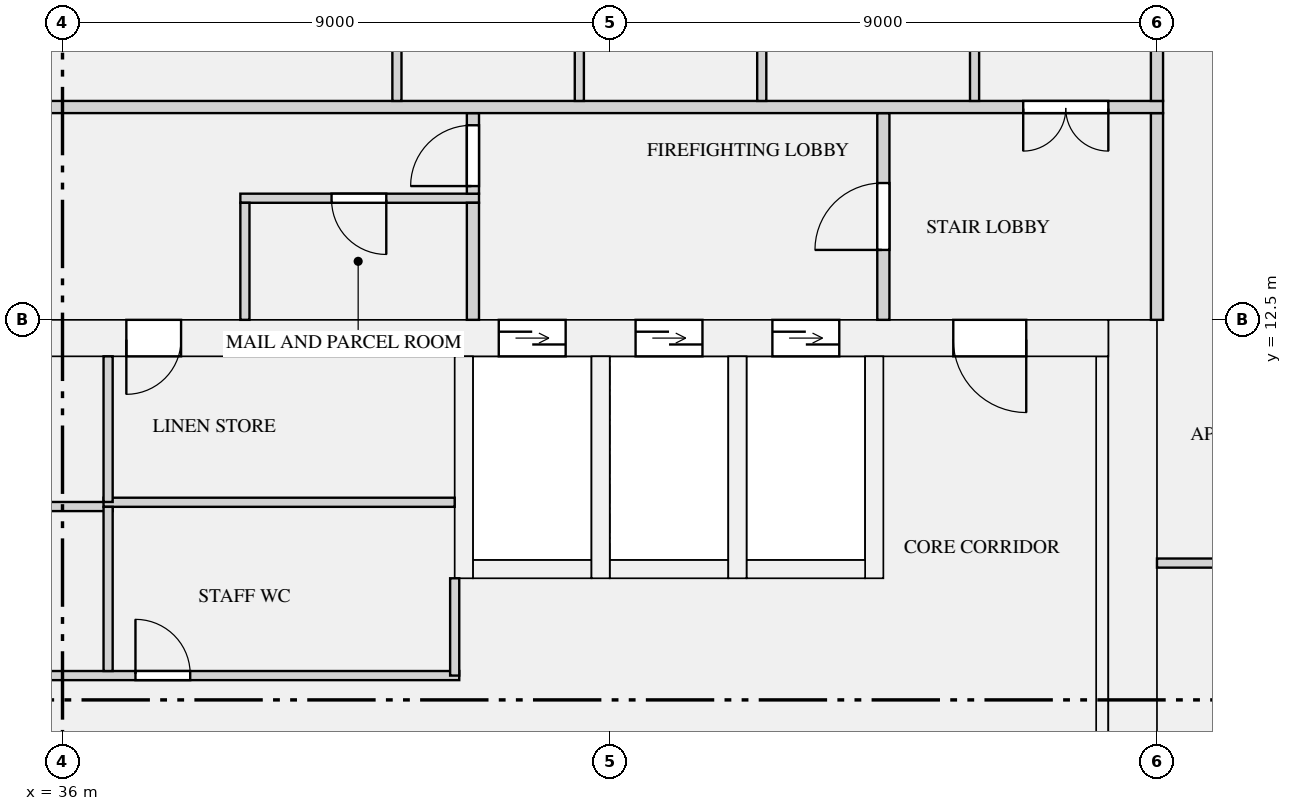
"""IFC4 building model, lengths in metres.
Left out: names, types, materials, properties, quantities, classifications, styles, units other than length and angle.
Written with IfcOpenShell. Run it as: python <this file> out.ifc"""

import sys

from ifc_helpers import new_model, si_unit, direction, frame, frame_2d, origin, place, context, subcontext, project, spatial, rectangle, extrude, element, fill, save


model = new_model("IFC4")
c1 = context("Model", 3, precision=1e-05, world=origin(), true_north=direction((0.0, 1.0)))
c2 = subcontext(c1, "Body", "Model", "MODEL_VIEW")
j1 = project(units=[si_unit("LENGTHUNIT", "METRE"), si_unit("PLANEANGLEUNIT", "RADIAN")], contexts=[c1])
p1 = place(None, origin())
s1 = spatial("IfcSite", under=j1, at=p1, CompositionType="ELEMENT")
p2 = place(p1, origin())
s2 = spatial("IfcBuilding", under=s1, at=p2, CompositionType="ELEMENT")
p3 = place(p2, frame((0.0, 0.0, 127.65)))
s3 = spatial("IfcBuildingStorey", under=s2, at=p3, CompositionType="ELEMENT", Elevation=127.65)
p4 = place(p3, frame((53.6, 0.0, 0.0), z_axis=(0.0, 0.0, 1.0), x_axis=(0.0, 1.0, 0.0)))
e1 = element("IfcWall", 1, at=p4, inside=s3, PredefinedType="SHEAR", context=c2, shape_type="SweptSolid", body=[
    extrude(rectangle(XDim=12.5, YDim=0.8, at=frame_2d((6.25, 0.0))), origin(), (0.0, 0.0, 1.0), 3.15),
])
p5 = place(p3, frame((18.8, 12.2, 0.0), z_axis=(0.0, 0.0, 1.0), x_axis=(1.0, 0.0, 0.0)))
e2 = element("IfcWall", 2, at=p5, inside=s3, PredefinedType="SHEAR", context=c2, shape_type="SweptSolid", body=[
    extrude(rectangle(XDim=34.4, YDim=0.6, at=frame_2d((17.2, 0.0))), origin(), (0.0, 0.0, 1.0), 3.15),
])
p6 = place(p5, frame((24.375, 0.0, 0.0)))
e3 = element("IfcOpeningElement", 3, at=p6, cuts=e2, PredefinedType="OPENING", context=c2, shape_type="SweptSolid", body=[
    extrude(rectangle(XDim=1.1, YDim=2.1, at=frame_2d((0.55, 1.05))), frame((0.0, 0.31, 0.0), z_axis=(0.0, -1.0, 0.0), x_axis=(1.0, 0.0, 0.0)), (0.0, 0.0, 1.0), 0.62),
])
p7 = place(p5, frame((26.625, 0.0, 0.0)))
e4 = element("IfcOpeningElement", 4, at=p7, cuts=e2, PredefinedType="OPENING", context=c2, shape_type="SweptSolid", body=[
    extrude(rectangle(XDim=1.1, YDim=2.1, at=frame_2d((0.55, 1.05))), frame((0.0, 0.31, 0.0), z_axis=(0.0, -1.0, 0.0), x_axis=(1.0, 0.0, 0.0)), (0.0, 0.0, 1.0), 0.62),
])
p8 = place(p5, frame((28.875, 0.0, 0.0)))
e5 = element("IfcOpeningElement", 5, at=p8, cuts=e2, PredefinedType="OPENING", context=c2, shape_type="SweptSolid", body=[
    extrude(rectangle(XDim=1.1, YDim=2.1, at=frame_2d((0.55, 1.05))), frame((0.0, 0.31, 0.0), z_axis=(0.0, -1.0, 0.0), x_axis=(1.0, 0.0, 0.0)), (0.0, 0.0, 1.0), 0.62),
])
p9 = place(p5, frame((4.75, 0.0, 0.0)))
e6 = element("IfcOpeningElement", 6, at=p9, cuts=e2, PredefinedType="OPENING", context=c2, shape_type="SweptSolid", body=[
    extrude(rectangle(XDim=0.9, YDim=2.1, at=frame_2d((0.45, 1.05))), frame((0.0, 0.31, 0.0), z_axis=(0.0, -1.0, 0.0), x_axis=(1.0, 0.0, 0.0)), (0.0, 0.0, 1.0), 0.62),
])
p10 = place(p5, frame((11.75, 0.0, 0.0)))
e7 = element("IfcOpeningElement", 7, at=p10, cuts=e2, PredefinedType="OPENING", context=c2, shape_type="SweptSolid", body=[
    extrude(rectangle(XDim=0.9, YDim=2.1, at=frame_2d((0.45, 1.05))), frame((0.0, 0.31, 0.0), z_axis=(0.0, -1.0, 0.0), x_axis=(1.0, 0.0, 0.0)), (0.0, 0.0, 1.0), 0.62),
])
p11 = place(p5, frame((18.25, 0.0, 0.0)))
e8 = element("IfcOpeningElement", 8, at=p11, cuts=e2, PredefinedType="OPENING", context=c2, shape_type="SweptSolid", body=[
    extrude(rectangle(XDim=0.9, YDim=2.1, at=frame_2d((0.45, 1.05))), frame((0.0, 0.31, 0.0), z_axis=(0.0, -1.0, 0.0), x_axis=(1.0, 0.0, 0.0)), (0.0, 0.0, 1.0), 0.62),
])
p12 = place(p5, frame((1.35, 0.0, 0.0)))
e9 = element("IfcOpeningElement", 9, at=p12, cuts=e2, PredefinedType="OPENING", context=c2, shape_type="SweptSolid", body=[
    extrude(rectangle(XDim=1.2, YDim=2.1, at=frame_2d((0.6, 1.05))), frame((0.0, 0.31, 0.0), z_axis=(0.0, -1.0, 0.0), x_axis=(1.0, 0.0, 0.0)), (0.0, 0.0, 1.0), 0.62),
])
p13 = place(p5, frame((31.85, 0.0, 0.0)))
e10 = element("IfcOpeningElement", 10, at=p13, cuts=e2, PredefinedType="OPENING", context=c2, shape_type="SweptSolid", body=[
    extrude(rectangle(XDim=1.2, YDim=2.1, at=frame_2d((0.6, 1.05))), frame((0.0, 0.31, 0.0), z_axis=(0.0, -1.0, 0.0), x_axis=(1.0, 0.0, 0.0)), (0.0, 0.0, 1.0), 0.62),
])
p14 = place(p3, frame((53.1, 1.0, 0.0), z_axis=(0.0, 0.0, 1.0), x_axis=(0.0, 1.0, 0.0)))
e11 = element("IfcWall", 11, at=p14, inside=s3, PredefinedType="SHEAR", context=c2, shape_type="SweptSolid", body=[
    extrude(rectangle(XDim=10.9, YDim=0.2, at=frame_2d((5.45, 0.0))), origin(), (0.0, 0.0, 1.0), 3.15),
])
p15 = place(p3, frame((42.75, 8.4, 0.0), z_axis=(0.0, 0.0, 1.0), x_axis=(1.0, 0.0, 0.0)))
e12 = element("IfcWall", 12, at=p15, inside=s3, PredefinedType="SHEAR", context=c2, shape_type="SweptSolid", body=[
    extrude(rectangle(XDim=1.95, YDim=0.3, at=frame_2d((0.975, 0.0))), origin(), (0.0, 0.0, 1.0), 3.15),
])
p16 = place(p3, frame((42.6, 8.25, 0.0), z_axis=(0.0, 0.0, 1.0), x_axis=(0.0, 1.0, 0.0)))
e13 = element("IfcWall", 13, at=p16, inside=s3, PredefinedType="SHEAR", context=c2, shape_type="SweptSolid", body=[
    extrude(rectangle(XDim=3.65, YDim=0.3, at=frame_2d((1.825, 0.0))), origin(), (0.0, 0.0, 1.0), 3.15),
])
p17 = place(p3, frame((45.0, 8.4, 0.0), z_axis=(0.0, 0.0, 1.0), x_axis=(1.0, 0.0, 0.0)))
e14 = element("IfcWall", 14, at=p17, inside=s3, PredefinedType="SHEAR", context=c2, shape_type="SweptSolid", body=[
    extrude(rectangle(XDim=1.95, YDim=0.3, at=frame_2d((0.975, 0.0))), origin(), (0.0, 0.0, 1.0), 3.15),
])
p18 = place(p3, frame((44.85, 8.25, 0.0), z_axis=(0.0, 0.0, 1.0), x_axis=(0.0, 1.0, 0.0)))
e15 = element("IfcWall", 15, at=p18, inside=s3, PredefinedType="SHEAR", context=c2, shape_type="SweptSolid", body=[
    extrude(rectangle(XDim=3.65, YDim=0.3, at=frame_2d((1.825, 0.0))), origin(), (0.0, 0.0, 1.0), 3.15),
])
p19 = place(p3, frame((47.25, 8.4, 0.0), z_axis=(0.0, 0.0, 1.0), x_axis=(1.0, 0.0, 0.0)))
e16 = element("IfcWall", 16, at=p19, inside=s3, PredefinedType="SHEAR", context=c2, shape_type="SweptSolid", body=[
    extrude(rectangle(XDim=1.95, YDim=0.3, at=frame_2d((0.975, 0.0))), origin(), (0.0, 0.0, 1.0), 3.15),
])
for number, where, z_axis, x_axis in (
    (17, (47.1, 8.25, 0.0), (0.0, 0.0, 1.0), (0.0, 1.0, 0.0)),
    (18, (49.35, 8.25, 0.0), (0.0, 0.0, 1.0), (0.0, 1.0, 0.0)),
):
    element("IfcWall", number, at=place(p3, frame(where, z_axis=z_axis, x_axis=x_axis)), inside=s3, PredefinedType="SHEAR", context=c2, shape_type="SweptSolid", body=[
        extrude(rectangle(XDim=3.65, YDim=0.3, at=frame_2d((1.825, 0.0))), origin(), (0.0, 0.0, 1.0), 3.15),
    ])
p20 = place(p3, frame((22.725, 6.65, 0.0), z_axis=(0.0, 0.0, 1.0), x_axis=(1.0, 0.0, 0.0)))
e19 = element("IfcWall", 19, at=p20, inside=s3, PredefinedType="PARTITIONING", context=c2, shape_type="SweptSolid", body=[
    extrude(rectangle(XDim=19.8, YDim=0.15, at=frame_2d((9.9, 0.0))), origin(), (0.0, 0.0, 1.0), 2.65),
])
p21 = place(p20, frame((0.825, 0.0, 0.0)))
e20 = element("IfcOpeningElement", 20, at=p21, cuts=e19, PredefinedType="OPENING", context=c2, shape_type="SweptSolid", body=[
    extrude(rectangle(XDim=0.9, YDim=2.1, at=frame_2d((0.45, 1.05))), frame((0.0, 0.085, 0.0), z_axis=(0.0, -1.0, 0.0), x_axis=(1.0, 0.0, 0.0)), (0.0, 0.0, 1.0), 0.17),
])
p22 = place(p20, frame((7.825, 0.0, 0.0)))
e21 = element("IfcOpeningElement", 21, at=p22, cuts=e19, PredefinedType="OPENING", context=c2, shape_type="SweptSolid", body=[
    extrude(rectangle(XDim=0.9, YDim=2.1, at=frame_2d((0.45, 1.05))), frame((0.0, 0.085, 0.0), z_axis=(0.0, -1.0, 0.0), x_axis=(1.0, 0.0, 0.0)), (0.0, 0.0, 1.0), 0.17),
])
p23 = place(p20, frame((14.475, 0.0, 0.0)))
e22 = element("IfcOpeningElement", 22, at=p23, cuts=e19, PredefinedType="OPENING", context=c2, shape_type="SweptSolid", body=[
    extrude(rectangle(XDim=0.9, YDim=2.1, at=frame_2d((0.45, 1.05))), frame((0.0, 0.085, 0.0), z_axis=(0.0, -1.0, 0.0), x_axis=(1.0, 0.0, 0.0)), (0.0, 0.0, 1.0), 0.17),
])
p24 = place(p3, frame((22.725, 9.43, 0.0), z_axis=(0.0, 0.0, 1.0), x_axis=(1.0, 0.0, 0.0)))
e23 = element("IfcWall", 23, at=p24, inside=s3, PredefinedType="PARTITIONING", context=c2, shape_type="SweptSolid", body=[
    extrude(rectangle(XDim=14.1, YDim=0.15, at=frame_2d((7.05, 0.0))), origin(), (0.0, 0.0, 1.0), 2.65),
])
p25 = place(p3, frame((36.675, 9.5, 0.0), z_axis=(0.0, 0.0, 1.0), x_axis=(1.0, 0.0, 0.0)))
e24 = element("IfcWall", 24, at=p25, inside=s3, PredefinedType="PARTITIONING", context=c2, shape_type="SweptSolid", body=[
    extrude(rectangle(XDim=5.775, YDim=0.15, at=frame_2d((2.887, 0.0))), origin(), (0.0, 0.0, 1.0), 2.65),
])
p26 = place(p3, frame((38.925, 14.5, 0.0), z_axis=(0.0, 0.0, 1.0), x_axis=(1.0, 0.0, 0.0)))
e25 = element("IfcWall", 25, at=p26, inside=s3, PredefinedType="PARTITIONING", context=c2, shape_type="SweptSolid", body=[
    extrude(rectangle(XDim=3.925, YDim=0.15, at=frame_2d((1.962, 0.0))), origin(), (0.0, 0.0, 1.0), 2.65),
])
p27 = place(p26, frame((1.5, 0.0, 0.0)))
e26 = element("IfcOpeningElement", 26, at=p27, cuts=e25, PredefinedType="OPENING", context=c2, shape_type="SweptSolid", body=[
    extrude(rectangle(XDim=0.9, YDim=2.1, at=frame_2d((0.45, 1.05))), frame((0.0, 0.085, 0.0), z_axis=(0.0, -1.0, 0.0), x_axis=(1.0, 0.0, 0.0)), (0.0, 0.0, 1.0), 0.17),
])
p28 = place(p3, frame((42.45, 6.65, 0.0), z_axis=(0.0, 0.0, 1.0), x_axis=(0.0, 1.0, 0.0)))
e27 = element("IfcWall", 27, at=p28, inside=s3, PredefinedType="PARTITIONING", context=c2, shape_type="SweptSolid", body=[
    extrude(rectangle(XDim=1.6, YDim=0.15, at=frame_2d((0.8, 0.0))), origin(), (0.0, 0.0, 1.0), 2.65),
])
p29 = place(p3, frame((36.75, 6.725, 0.0), z_axis=(0.0, 0.0, 1.0), x_axis=(0.0, 1.0, 0.0)))
e28 = element("IfcWall", 28, at=p29, inside=s3, PredefinedType="PARTITIONING", context=c2, shape_type="SweptSolid", body=[
    extrude(rectangle(XDim=2.7, YDim=0.15, at=frame_2d((1.35, 0.0))), origin(), (0.0, 0.0, 1.0), 2.65),
])
p30 = place(p3, frame((36.75, 9.505, 0.0), z_axis=(0.0, 0.0, 1.0), x_axis=(0.0, 1.0, 0.0)))
e29 = element("IfcWall", 29, at=p30, inside=s3, PredefinedType="PARTITIONING", context=c2, shape_type="SweptSolid", body=[
    extrude(rectangle(XDim=2.395, YDim=0.15, at=frame_2d((1.198, 0.0))), origin(), (0.0, 0.0, 1.0), 2.65),
])
p31 = place(p3, frame((39.0, 12.5, 0.0), z_axis=(0.0, 0.0, 1.0), x_axis=(0.0, 1.0, 0.0)))
e30 = element("IfcWall", 30, at=p31, inside=s3, PredefinedType="PARTITIONING", context=c2, shape_type="SweptSolid", body=[
    extrude(rectangle(XDim=1.925, YDim=0.15, at=frame_2d((0.962, 0.0))), origin(), (0.0, 0.0, 1.0), 2.65),
])
p32 = place(p3, frame((42.75, 12.5, 0.0), z_axis=(0.0, 0.0, 1.0), x_axis=(0.0, 1.0, 0.0)))
e31 = element("IfcWall", 31, at=p32, inside=s3, PredefinedType="PARTITIONING", context=c2, shape_type="SweptSolid", body=[
    extrude(rectangle(XDim=1.925, YDim=0.2, at=frame_2d((0.962, 0.0))), origin(), (0.0, 0.0, 1.0), 2.65),
])
p33 = place(p3, frame((49.5, 12.5, 0.0), z_axis=(0.0, 0.0, 1.0), x_axis=(0.0, 1.0, 0.0)))
e32 = element("IfcWall", 32, at=p33, inside=s3, PredefinedType="PARTITIONING", context=c2, shape_type="SweptSolid", body=[
    extrude(rectangle(XDim=3.4, YDim=0.2, at=frame_2d((1.7, 0.0))), origin(), (0.0, 0.0, 1.0), 2.65),
])
p34 = place(p33, frame((1.15, 0.0, 0.0)))
e33 = element("IfcOpeningElement", 33, at=p34, cuts=e32, PredefinedType="OPENING", context=c2, shape_type="SweptSolid", body=[
    extrude(rectangle(XDim=1.1, YDim=2.1, at=frame_2d((0.55, 1.05))), frame((0.0, 0.11, 0.0), z_axis=(0.0, -1.0, 0.0), x_axis=(1.0, 0.0, 0.0)), (0.0, 0.0, 1.0), 0.22),
])
p35 = place(p3, frame((54.0, 12.5, 0.0), z_axis=(0.0, 0.0, 1.0), x_axis=(0.0, 1.0, 0.0)))
e34 = element("IfcWall", 34, at=p35, inside=s3, PredefinedType="PARTITIONING", context=c2, shape_type="SweptSolid", body=[
    extrude(rectangle(XDim=3.4, YDim=0.2, at=frame_2d((1.7, 0.0))), origin(), (0.0, 0.0, 1.0), 2.65),
])
p36 = place(p3, frame((42.75, 14.575, 0.0), z_axis=(0.0, 0.0, 1.0), x_axis=(0.0, 1.0, 0.0)))
e35 = element("IfcWall", 35, at=p36, inside=s3, PredefinedType="PARTITIONING", context=c2, shape_type="SweptSolid", body=[
    extrude(rectangle(XDim=1.325, YDim=0.2, at=frame_2d((0.663, 0.0))), origin(), (0.0, 0.0, 1.0), 2.65),
])
p37 = place(p36, frame((0.125, 0.0, 0.0)))
e36 = element("IfcOpeningElement", 36, at=p37, cuts=e35, PredefinedType="OPENING", context=c2, shape_type="SweptSolid", body=[
    extrude(rectangle(XDim=1.0, YDim=2.1, at=frame_2d((0.5, 1.05))), frame((0.0, 0.11, 0.0), z_axis=(0.0, -1.0, 0.0), x_axis=(1.0, 0.0, 0.0)), (0.0, 0.0, 1.0), 0.22),
])
p38 = place(p3, frame((54.0, 8.5, 0.0), z_axis=(0.0, 0.0, 1.0), x_axis=(1.0, 0.0, 0.0)))
e37 = element("IfcWall", 37, at=p38, inside=s3, PredefinedType="PARTITIONING", context=c2, shape_type="SweptSolid", body=[
    extrude(rectangle(XDim=17.925, YDim=0.15, at=frame_2d((8.962, 0.0))), origin(), (0.0, 0.0, 1.0), 2.65),
])
p39 = place(p38, frame((1.8, 0.0, 0.0)))
e38 = element("IfcOpeningElement", 38, at=p39, cuts=e37, PredefinedType="OPENING", context=c2, shape_type="SweptSolid", body=[
    extrude(rectangle(XDim=0.9, YDim=2.1, at=frame_2d((0.45, 1.05))), frame((0.0, 0.085, 0.0), z_axis=(0.0, -1.0, 0.0), x_axis=(1.0, 0.0, 0.0)), (0.0, 0.0, 1.0), 0.17),
])
p40 = place(p38, frame((12.75, 0.0, 0.0)))
e39 = element("IfcOpeningElement", 39, at=p40, cuts=e37, PredefinedType="OPENING", context=c2, shape_type="SweptSolid", body=[
    extrude(rectangle(XDim=1.5, YDim=2.1, at=frame_2d((0.75, 1.05))), frame((0.0, 0.085, 0.0), z_axis=(0.0, -1.0, 0.0), x_axis=(1.0, 0.0, 0.0)), (0.0, 0.0, 1.0), 0.17),
])
p41 = place(p38, frame((6.3, 0.0, 0.0)))
e40 = element("IfcOpeningElement", 40, at=p41, cuts=e37, PredefinedType="OPENING", context=c2, shape_type="SweptSolid", body=[
    extrude(rectangle(XDim=0.9, YDim=2.1, at=frame_2d((0.45, 1.05))), frame((0.0, 0.085, 0.0), z_axis=(0.0, -1.0, 0.0), x_axis=(1.0, 0.0, 0.0)), (0.0, 0.0, 1.0), 0.17),
])
p42 = place(p3, frame((17.9, 16.0, 0.0), z_axis=(0.0, 0.0, 1.0), x_axis=(1.0, 0.0, 0.0)))
e41 = element("IfcWall", 41, at=p42, inside=s3, PredefinedType="PARTITIONING", context=c2, shape_type="SweptSolid", body=[
    extrude(rectangle(XDim=36.2, YDim=0.2, at=frame_2d((18.1, 0.0))), origin(), (0.0, 0.0, 1.0), 2.65),
])
p43 = place(p42, frame((0.9, 0.0, 0.0)))
e42 = element("IfcOpeningElement", 42, at=p43, cuts=e41, PredefinedType="OPENING", context=c2, shape_type="SweptSolid", body=[
    extrude(rectangle(XDim=1.4, YDim=2.1, at=frame_2d((0.7, 1.05))), frame((0.0, 0.11, 0.0), z_axis=(0.0, -1.0, 0.0), x_axis=(1.0, 0.0, 0.0)), (0.0, 0.0, 1.0), 0.22),
])
p44 = place(p42, frame((33.9, 0.0, 0.0)))
e43 = element("IfcOpeningElement", 43, at=p44, cuts=e41, PredefinedType="OPENING", context=c2, shape_type="SweptSolid", body=[
    extrude(rectangle(XDim=1.4, YDim=2.1, at=frame_2d((0.7, 1.05))), frame((0.0, 0.11, 0.0), z_axis=(0.0, -1.0, 0.0), x_axis=(1.0, 0.0, 0.0)), (0.0, 0.0, 1.0), 0.22),
])
p45 = place(p3, frame((54.0, 16.1, 0.0), z_axis=(0.0, 0.0, 1.0), x_axis=(0.0, 1.0, 0.0)))
e44 = element("IfcWall", 44, at=p45, inside=s3, PredefinedType="PARTITIONING", context=c2, shape_type="SweptSolid", body=[
    extrude(rectangle(XDim=7.8, YDim=0.2, at=frame_2d((3.9, 0.0))), origin(), (0.0, 0.0, 1.0), 2.65),
])
p46 = place(p45, frame((2.35, 0.0, 0.0)))
e45 = element("IfcOpeningElement", 45, at=p46, cuts=e44, PredefinedType="OPENING", context=c2, shape_type="SweptSolid", body=[
    extrude(rectangle(XDim=1.1, YDim=2.1, at=frame_2d((0.55, 1.05))), frame((0.0, 0.11, 0.0), z_axis=(0.0, -1.0, 0.0), x_axis=(1.0, 0.0, 0.0)), (0.0, 0.0, 1.0), 0.22),
])
p47 = place(p3, frame((51.0, 16.1, 0.0), z_axis=(0.0, 0.0, 1.0), x_axis=(0.0, 1.0, 0.0)))
e46 = element("IfcWall", 46, at=p47, inside=s3, PredefinedType="PARTITIONING", context=c2, shape_type="SweptSolid", body=[
    extrude(rectangle(XDim=4.825, YDim=0.15, at=frame_2d((2.413, 0.0))), origin(), (0.0, 0.0, 1.0), 2.65),
])
p48 = place(p47, frame((1.95, 0.0, 0.0)))
e47 = element("IfcOpeningElement", 47, at=p48, cuts=e46, PredefinedType="OPENING", context=c2, shape_type="SweptSolid", body=[
    extrude(rectangle(XDim=0.9, YDim=2.1, at=frame_2d((0.45, 1.05))), frame((0.0, 0.085, 0.0), z_axis=(0.0, -1.0, 0.0), x_axis=(1.0, 0.0, 0.0)), (0.0, 0.0, 1.0), 0.17),
])
for number, where, z_axis, x_axis in (
    (48, (41.5, 16.1, 0.0), (0.0, 0.0, 1.0), (0.0, 1.0, 0.0)),
    (49, (44.5, 16.1, 0.0), (0.0, 0.0, 1.0), (0.0, 1.0, 0.0)),
    (50, (47.5, 16.1, 0.0), (0.0, 0.0, 1.0), (0.0, 1.0, 0.0)),
):
    element("IfcWall", number, at=place(p3, frame(where, z_axis=z_axis, x_axis=x_axis)), inside=s3, PredefinedType="PARTITIONING", context=c2, shape_type="SweptSolid", body=[
        extrude(rectangle(XDim=4.825, YDim=0.15, at=frame_2d((2.413, 0.0))), origin(), (0.0, 0.0, 1.0), 2.65),
    ])
p49 = place(p6, origin())
e51 = element("IfcDoor", 51, at=p49, inside=s3, OperationType="DOUBLE_DOOR_SLIDING", PredefinedType="DOOR", context=c2, shape_type="SweptSolid", body=[
    extrude(rectangle(XDim=1.1, YDim=2.1, at=frame_2d((0.55, 1.05))), frame((0.0, 0.025, 0.0), z_axis=(0.0, -1.0, 0.0), x_axis=(1.0, 0.0, 0.0)), (0.0, 0.0, 1.0), 0.05),
])
fill(e3, e51)
p50 = place(p7, origin())
e52 = element("IfcDoor", 52, at=p50, inside=s3, OperationType="DOUBLE_DOOR_SLIDING", PredefinedType="DOOR", context=c2, shape_type="SweptSolid", body=[
    extrude(rectangle(XDim=1.1, YDim=2.1, at=frame_2d((0.55, 1.05))), frame((0.0, 0.025, 0.0), z_axis=(0.0, -1.0, 0.0), x_axis=(1.0, 0.0, 0.0)), (0.0, 0.0, 1.0), 0.05),
])
fill(e4, e52)
p51 = place(p8, origin())
e53 = element("IfcDoor", 53, at=p51, inside=s3, OperationType="DOUBLE_DOOR_SLIDING", PredefinedType="DOOR", context=c2, shape_type="SweptSolid", body=[
    extrude(rectangle(XDim=1.1, YDim=2.1, at=frame_2d((0.55, 1.05))), frame((0.0, 0.025, 0.0), z_axis=(0.0, -1.0, 0.0), x_axis=(1.0, 0.0, 0.0)), (0.0, 0.0, 1.0), 0.05),
])
fill(e5, e53)
p52 = place(p27, frame((0.9, 0.0, 0.0), z_axis=(0.0, 0.0, 1.0), x_axis=(-1.0, 0.0, 0.0)))
e54 = element("IfcDoor", 54, at=p52, inside=s3, OperationType="SINGLE_SWING_LEFT", PredefinedType="DOOR", context=c2, shape_type="SweptSolid", body=[
    extrude(rectangle(XDim=0.9, YDim=2.1, at=frame_2d((0.45, 1.05))), frame((0.0, 0.025, 0.0), z_axis=(0.0, -1.0, 0.0), x_axis=(1.0, 0.0, 0.0)), (0.0, 0.0, 1.0), 0.05),
])
fill(e26, e54)
p53 = place(p23, origin())
e55 = element("IfcDoor", 55, at=p53, inside=s3, OperationType="SINGLE_SWING_LEFT", PredefinedType="DOOR", context=c2, shape_type="SweptSolid", body=[
    extrude(rectangle(XDim=0.9, YDim=2.1, at=frame_2d((0.45, 1.05))), frame((0.0, 0.025, 0.0), z_axis=(0.0, -1.0, 0.0), x_axis=(1.0, 0.0, 0.0)), (0.0, 0.0, 1.0), 0.05),
])
fill(e22, e55)
p54 = place(p11, frame((0.9, 0.0, 0.0), z_axis=(0.0, 0.0, 1.0), x_axis=(-1.0, 0.0, 0.0)))
e56 = element("IfcDoor", 56, at=p54, inside=s3, OperationType="SINGLE_SWING_RIGHT", PredefinedType="DOOR", context=c2, shape_type="SweptSolid", body=[
    extrude(rectangle(XDim=0.9, YDim=2.1, at=frame_2d((0.45, 1.05))), frame((0.0, 0.025, 0.0), z_axis=(0.0, -1.0, 0.0), x_axis=(1.0, 0.0, 0.0)), (0.0, 0.0, 1.0), 0.05),
])
fill(e8, e56)
p55 = place(p13, frame((1.2, 0.0, 0.0), z_axis=(0.0, 0.0, 1.0), x_axis=(-1.0, 0.0, 0.0)))
e57 = element("IfcDoor", 57, at=p55, inside=s3, OperationType="SINGLE_SWING_LEFT", PredefinedType="DOOR", context=c2, shape_type="SweptSolid", body=[
    extrude(rectangle(XDim=1.2, YDim=2.1, at=frame_2d((0.6, 1.05))), frame((0.0, 0.025, 0.0), z_axis=(0.0, -1.0, 0.0), x_axis=(1.0, 0.0, 0.0)), (0.0, 0.0, 1.0), 0.05),
])
fill(e10, e57)
p56 = place(p37, origin())
e58 = element("IfcDoor", 58, at=p56, inside=s3, OperationType="SINGLE_SWING_LEFT", PredefinedType="DOOR", context=c2, shape_type="SweptSolid", body=[
    extrude(rectangle(XDim=1.0, YDim=2.1, at=frame_2d((0.5, 1.05))), frame((0.0, 0.025, 0.0), z_axis=(0.0, -1.0, 0.0), x_axis=(1.0, 0.0, 0.0)), (0.0, 0.0, 1.0), 0.05),
])
fill(e36, e58)
p57 = place(p34, origin())
e59 = element("IfcDoor", 59, at=p57, inside=s3, OperationType="SINGLE_SWING_LEFT", PredefinedType="DOOR", context=c2, shape_type="SweptSolid", body=[
    extrude(rectangle(XDim=1.1, YDim=2.1, at=frame_2d((0.55, 1.05))), frame((0.0, 0.025, 0.0), z_axis=(0.0, -1.0, 0.0), x_axis=(1.0, 0.0, 0.0)), (0.0, 0.0, 1.0), 0.05),
])
fill(e33, e59)
p58 = place(p44, frame((1.4, 0.0, 0.0), z_axis=(0.0, 0.0, 1.0), x_axis=(-1.0, 0.0, 0.0)))
e60 = element("IfcDoor", 60, at=p58, inside=s3, OperationType="DOUBLE_DOOR_SINGLE_SWING", PredefinedType="DOOR", context=c2, shape_type="SweptSolid", body=[
    extrude(rectangle(XDim=1.4, YDim=2.1, at=frame_2d((0.7, 1.05))), frame((0.0, 0.025, 0.0), z_axis=(0.0, -1.0, 0.0), x_axis=(1.0, 0.0, 0.0)), (0.0, 0.0, 1.0), 0.05),
])
fill(e43, e60)
save(model, sys.argv[1])
